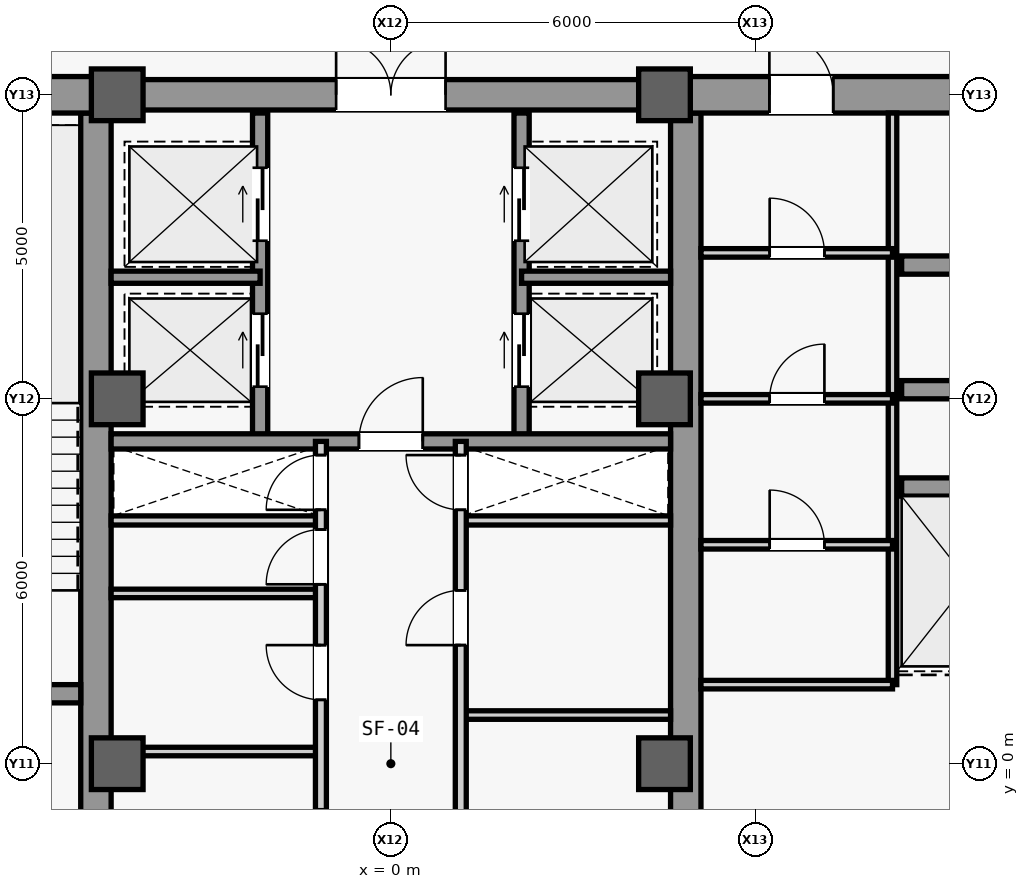
"""IFC4 building model, lengths in metres.
Left out: names, types, materials, properties, quantities, classifications, styles, units other than length and angle.
Written with IfcOpenShell. Run it as: python <this file> out.ifc"""

import sys

from ifc_helpers import new_model, si_unit, direction, frame, frame_2d, origin, origin_2d, place, context, subcontext, project, spatial, rectangle, extrude, source, transform, mapped, element, fill, save


model = new_model("IFC4")
c1 = context("Model", 3, precision=1e-05, world=origin(), true_north=direction((0.0, 1.0)))
c2 = subcontext(c1, "Body", "Model", "MODEL_VIEW")
j1 = project(units=[si_unit("LENGTHUNIT", "METRE"), si_unit("PLANEANGLEUNIT", "RADIAN")], contexts=[c1])
p1 = place(None, origin())
s1 = spatial("IfcSite", under=j1, at=p1, CompositionType="ELEMENT")
p2 = place(p1, origin())
s2 = spatial("IfcBuilding", under=s1, at=p2, CompositionType="ELEMENT")
p3 = place(p2, frame((0.0, 0.0, 235.1)))
s3 = spatial("IfcBuildingStorey", under=s2, at=p3, CompositionType="ELEMENT", Elevation=235.1)
m1 = source(origin(), c2, "Body", "SweptSolid", [
    extrude(rectangle(XDim=21.4, YDim=0.5, at=frame_2d((10.7, 0.0))), origin(), (0.0, 0.0, 1.0), 3.78),
])
for number, where, z_axis, x_axis in (
    (1, (-4.85, -10.7, 0.0), (0.0, 0.0, 1.0), (0.0, 1.0, 0.0)),
    (2, (4.85, -10.7, 0.0), (0.0, 0.0, 1.0), (0.0, 1.0, 0.0)),
):
    element("IfcWall", number, at=place(p3, frame(where, z_axis=z_axis, x_axis=x_axis)), inside=s3, PredefinedType="SHEAR", context=c2, shape_type="MappedRepresentation", body=[
        mapped(m1, transform((0.0, 0.0, 0.0), scale=1.0)),
    ])
m2 = source(origin(), c2, "Body", "SweptSolid", [
    extrude(rectangle(XDim=5.9, YDim=0.6, at=frame_2d((2.95, 0.0))), origin(), (0.0, 0.0, 1.0), 3.78),
])
p4 = place(p3, frame((-10.75, 11.0, 0.0), z_axis=(0.0, 0.0, 1.0), x_axis=(1.0, 0.0, 0.0)))
e3 = element("IfcWall", 3, at=p4, inside=s3, PredefinedType="SHEAR", context=c2, shape_type="MappedRepresentation", body=[
    mapped(m2, transform((0.0, 0.0, 0.0), scale=1.0)),
])
p5 = place(p3, frame((4.85, 11.0, 0.0), z_axis=(0.0, 0.0, 1.0), x_axis=(1.0, 0.0, 0.0)))
e4 = element("IfcWall", 4, at=p5, inside=s3, PredefinedType="SHEAR", context=c2, shape_type="MappedRepresentation", body=[
    mapped(m2, transform((0.0, 0.0, 0.0), scale=1.0)),
])
m3 = source(origin(), c2, "Body", "SweptSolid", [
    extrude(rectangle(XDim=1.05, YDim=2.2, at=frame_2d((0.525, 1.1))), frame((0.0, 0.31, 0.0), z_axis=(0.0, -1.0, 0.0), x_axis=(1.0, 0.0, 0.0)), (0.0, 0.0, 1.0), 0.62),
])
p6 = place(p5, frame((1.375, 0.0, 0.0)))
e5 = element("IfcOpeningElement", 5, at=p6, cuts=e4, PredefinedType="OPENING", context=c2, shape_type="MappedRepresentation", body=[
    mapped(m3, transform((0.0, 0.0, 0.0), scale=1.0)),
])
m4 = source(origin(), c2, "Body", "SweptSolid", [
    extrude(rectangle(XDim=5.65, YDim=0.3, at=frame_2d((2.825, 0.0))), origin(), (0.0, 0.0, 1.0), 3.78),
])
p7 = place(p3, frame((-10.75, 1.15, 0.0), z_axis=(0.0, 0.0, 1.0), x_axis=(1.0, 0.0, 0.0)))
e6 = element("IfcWall", 6, at=p7, inside=s3, PredefinedType="SHEAR", context=c2, shape_type="MappedRepresentation", body=[
    mapped(m4, transform((0.0, 0.0, 0.0), scale=1.0)),
])
m5 = source(origin(), c2, "Body", "SweptSolid", [
    extrude(rectangle(XDim=9.2, YDim=0.5, at=frame_2d((4.6, 0.0))), origin(), (0.0, 0.0, 1.0), 3.78),
])
p8 = place(p3, frame((-4.6, 11.0, 0.0), z_axis=(0.0, 0.0, 1.0), x_axis=(1.0, 0.0, 0.0)))
e7 = element("IfcWall", 7, at=p8, inside=s3, PredefinedType="SHEAR", context=c2, shape_type="MappedRepresentation", body=[
    mapped(m5, transform((0.0, 0.0, 0.0), scale=1.0)),
])
m6 = source(origin(), c2, "Body", "SweptSolid", [
    extrude(rectangle(XDim=1.8, YDim=2.25, at=frame_2d((0.9, 1.125))), frame((0.0, 0.26, 0.0), z_axis=(0.0, -1.0, 0.0), x_axis=(1.0, 0.0, 0.0)), (0.0, 0.0, 1.0), 0.52),
])
p9 = place(p8, frame((3.7, 0.0, 0.0)))
e8 = element("IfcOpeningElement", 8, at=p9, cuts=e7, PredefinedType="OPENING", context=c2, shape_type="MappedRepresentation", body=[
    mapped(m6, transform((0.0, 0.0, 0.0), scale=1.0)),
])
m7 = source(origin(), c2, "Body", "SweptSolid", [
    extrude(rectangle(XDim=0.85, YDim=0.85, at=origin_2d()), origin(), (0.0, 0.0, 1.0), 4.0),
])
for number, where, z_axis, x_axis in (
    (9, (-4.5, 0.0, 0.0), (0.0, 0.0, 1.0), (1.0, 0.0, 0.0)),
    (10, (-4.5, 6.0, 0.0), (0.0, 0.0, 1.0), (1.0, 0.0, 0.0)),
    (11, (-4.5, 11.0, 0.0), (0.0, 0.0, 1.0), (1.0, 0.0, 0.0)),
    (12, (4.5, 0.0, 0.0), (0.0, 0.0, 1.0), (1.0, 0.0, 0.0)),
    (13, (4.5, 6.0, 0.0), (0.0, 0.0, 1.0), (1.0, 0.0, 0.0)),
    (14, (4.5, 11.0, 0.0), (0.0, 0.0, 1.0), (1.0, 0.0, 0.0)),
):
    element("IfcColumn", number, at=place(p3, frame(where, z_axis=z_axis, x_axis=x_axis)), inside=s3, PredefinedType="COLUMN", context=c2, shape_type="MappedRepresentation", body=[
        mapped(m7, transform((0.0, 0.0, 0.0), scale=1.0)),
    ])
m8 = source(origin(), c2, "Body", "SweptSolid", [
    extrude(rectangle(XDim=2.3, YDim=0.3, at=frame_2d((1.15, 0.0))), origin(), (0.0, 0.0, 1.0), 3.78),
])
for number, where, z_axis, x_axis in (
    (15, (8.4, 4.55, 0.0), (0.0, 0.0, 1.0), (1.0, 0.0, 0.0)),
    (16, (8.4, 6.15, 0.0), (0.0, 0.0, 1.0), (1.0, 0.0, 0.0)),
    (17, (8.4, 8.2, 0.0), (0.0, 0.0, 1.0), (1.0, 0.0, 0.0)),
):
    element("IfcWall", number, at=place(p3, frame(where, z_axis=z_axis, x_axis=x_axis)), inside=s3, PredefinedType="SHEAR", context=c2, shape_type="MappedRepresentation", body=[
        mapped(m8, transform((0.0, 0.0, 0.0), scale=1.0)),
    ])
m9 = source(origin(), c2, "Body", "SweptSolid", [
    extrude(rectangle(XDim=9.4, YDim=0.14, at=frame_2d((4.7, 0.0))), origin(), (0.0, 0.0, 1.0), 3.78),
])
p10 = place(p3, frame((8.25, 1.3, 0.0), z_axis=(0.0, 0.0, 1.0), x_axis=(0.0, 1.0, 0.0)))
e18 = element("IfcWall", 18, at=p10, inside=s3, PredefinedType="PARTITIONING", context=c2, shape_type="MappedRepresentation", body=[
    mapped(m9, transform((0.0, 0.0, 0.0), scale=1.0)),
])
m10 = source(origin(), c2, "Body", "SweptSolid", [
    extrude(rectangle(XDim=3.15, YDim=0.14, at=frame_2d((1.575, 0.0))), origin(), (0.0, 0.0, 1.0), 3.78),
])
p11 = place(p3, frame((5.1, 1.3, 0.0), z_axis=(0.0, 0.0, 1.0), x_axis=(1.0, 0.0, 0.0)))
e19 = element("IfcWall", 19, at=p11, inside=s3, PredefinedType="PARTITIONING", context=c2, shape_type="MappedRepresentation", body=[
    mapped(m10, transform((0.0, 0.0, 0.0), scale=1.0)),
])
p12 = place(p3, frame((5.1, 8.4, 0.0), z_axis=(0.0, 0.0, 1.0), x_axis=(1.0, 0.0, 0.0)))
e20 = element("IfcWall", 20, at=p12, inside=s3, PredefinedType="PARTITIONING", context=c2, shape_type="MappedRepresentation", body=[
    mapped(m10, transform((0.0, 0.0, 0.0), scale=1.0)),
])
m11 = source(origin(), c2, "Body", "SweptSolid", [
    extrude(rectangle(XDim=0.9, YDim=2.15, at=frame_2d((0.45, 1.075))), frame((0.0, 0.08, 0.0), z_axis=(0.0, -1.0, 0.0), x_axis=(1.0, 0.0, 0.0)), (0.0, 0.0, 1.0), 0.16),
])
p13 = place(p12, frame((1.13, 0.0, 0.0)))
e21 = element("IfcOpeningElement", 21, at=p13, cuts=e20, PredefinedType="OPENING", context=c2, shape_type="MappedRepresentation", body=[
    mapped(m11, transform((0.0, 0.0, 0.0), scale=1.0)),
])
p14 = place(p3, frame((5.1, 6.0, 0.0), z_axis=(0.0, 0.0, 1.0), x_axis=(1.0, 0.0, 0.0)))
e22 = element("IfcWall", 22, at=p14, inside=s3, PredefinedType="PARTITIONING", context=c2, shape_type="MappedRepresentation", body=[
    mapped(m10, transform((0.0, 0.0, 0.0), scale=1.0)),
])
p15 = place(p14, frame((1.13, 0.0, 0.0)))
e23 = element("IfcOpeningElement", 23, at=p15, cuts=e22, PredefinedType="OPENING", context=c2, shape_type="MappedRepresentation", body=[
    mapped(m11, transform((0.0, 0.0, 0.0), scale=1.0)),
])
p16 = place(p3, frame((5.1, 3.6, 0.0), z_axis=(0.0, 0.0, 1.0), x_axis=(1.0, 0.0, 0.0)))
e24 = element("IfcWall", 24, at=p16, inside=s3, PredefinedType="PARTITIONING", context=c2, shape_type="MappedRepresentation", body=[
    mapped(m10, transform((0.0, 0.0, 0.0), scale=1.0)),
])
p17 = place(p16, frame((1.13, 0.0, 0.0)))
e25 = element("IfcOpeningElement", 25, at=p17, cuts=e24, PredefinedType="OPENING", context=c2, shape_type="MappedRepresentation", body=[
    mapped(m11, transform((0.0, 0.0, 0.0), scale=1.0)),
])
m12 = source(origin(), c2, "Body", "SweptSolid", [
    extrude(rectangle(XDim=3.45, YDim=0.15, at=frame_2d((1.725, 0.0))), origin(), (0.0, 0.0, 1.0), 3.78),
])
for number, where, z_axis, x_axis in (
    (26, (-4.6, 4.0, 0.0), (0.0, 0.0, 1.0), (1.0, 0.0, 0.0)),
    (27, (1.15, 4.0, 0.0), (0.0, 0.0, 1.0), (1.0, 0.0, 0.0)),
):
    element("IfcWall", number, at=place(p3, frame(where, z_axis=z_axis, x_axis=x_axis)), inside=s3, PredefinedType="PARTITIONING", context=c2, shape_type="MappedRepresentation", body=[
        mapped(m12, transform((0.0, 0.0, 0.0), scale=1.0)),
    ])
m13 = source(origin(), c2, "Body", "SweptSolid", [
    extrude(rectangle(XDim=5.4, YDim=0.25, at=frame_2d((2.7, 0.0))), origin(), (0.0, 0.0, 1.0), 3.78),
])
p18 = place(p3, frame((-2.15, 5.3, 0.0), z_axis=(0.0, 0.0, 1.0), x_axis=(0.0, 1.0, 0.0)))
e28 = element("IfcWall", 28, at=p18, inside=s3, PredefinedType="SHEAR", context=c2, shape_type="MappedRepresentation", body=[
    mapped(m13, transform((0.0, 0.0, 0.0), scale=1.0)),
])
m14 = source(origin(), c2, "Body", "SweptSolid", [
    extrude(rectangle(XDim=1.2, YDim=2.3, at=frame_2d((0.6, 1.15))), frame((0.0, 0.135, 0.0), z_axis=(0.0, -1.0, 0.0), x_axis=(1.0, 0.0, 0.0)), (0.0, 0.0, 1.0), 0.27),
])
p19 = place(p18, frame((3.3, 0.0, 0.0)))
e29 = element("IfcOpeningElement", 29, at=p19, cuts=e28, PredefinedType="OPENING", context=c2, shape_type="MappedRepresentation", body=[
    mapped(m14, transform((0.0, 0.0, 0.0), scale=1.0)),
])
p20 = place(p18, frame((0.9, 0.0, 0.0)))
e30 = element("IfcOpeningElement", 30, at=p20, cuts=e28, PredefinedType="OPENING", context=c2, shape_type="MappedRepresentation", body=[
    mapped(m14, transform((0.0, 0.0, 0.0), scale=1.0)),
])
p21 = place(p3, frame((2.15, 5.3, 0.0), z_axis=(0.0, 0.0, 1.0), x_axis=(0.0, 1.0, 0.0)))
e31 = element("IfcWall", 31, at=p21, inside=s3, PredefinedType="SHEAR", context=c2, shape_type="MappedRepresentation", body=[
    mapped(m13, transform((0.0, 0.0, 0.0), scale=1.0)),
])
p22 = place(p21, frame((3.3, 0.0, 0.0)))
e32 = element("IfcOpeningElement", 32, at=p22, cuts=e31, PredefinedType="OPENING", context=c2, shape_type="MappedRepresentation", body=[
    mapped(m14, transform((0.0, 0.0, 0.0), scale=1.0)),
])
p23 = place(p21, frame((0.9, 0.0, 0.0)))
e33 = element("IfcOpeningElement", 33, at=p23, cuts=e31, PredefinedType="OPENING", context=c2, shape_type="MappedRepresentation", body=[
    mapped(m14, transform((0.0, 0.0, 0.0), scale=1.0)),
])
m15 = source(origin(), c2, "Body", "SweptSolid", [
    extrude(rectangle(XDim=2.45, YDim=0.2, at=frame_2d((1.225, 0.0))), origin(), (0.0, 0.0, 1.0), 3.78),
])
for number, where, z_axis, x_axis in (
    (34, (-4.6, 8.0, 0.0), (0.0, 0.0, 1.0), (1.0, 0.0, 0.0)),
    (35, (2.15, 8.0, 0.0), (0.0, 0.0, 1.0), (1.0, 0.0, 0.0)),
):
    element("IfcWall", number, at=place(p3, frame(where, z_axis=z_axis, x_axis=x_axis)), inside=s3, PredefinedType="SHEAR", context=c2, shape_type="MappedRepresentation", body=[
        mapped(m15, transform((0.0, 0.0, 0.0), scale=1.0)),
    ])
m16 = source(origin(), c2, "Body", "SweptSolid", [
    extrude(rectangle(XDim=9.2, YDim=0.25, at=frame_2d((4.6, 0.0))), origin(), (0.0, 0.0, 1.0), 3.78),
])
p24 = place(p3, frame((-4.6, 5.3, 0.0), z_axis=(0.0, 0.0, 1.0), x_axis=(1.0, 0.0, 0.0)))
e36 = element("IfcWall", 36, at=p24, inside=s3, PredefinedType="SHEAR", context=c2, shape_type="MappedRepresentation", body=[
    mapped(m16, transform((0.0, 0.0, 0.0), scale=1.0)),
])
m17 = source(origin(), c2, "Body", "SweptSolid", [
    extrude(rectangle(XDim=1.05, YDim=2.2, at=frame_2d((0.525, 1.1))), frame((0.0, 0.135, 0.0), z_axis=(0.0, -1.0, 0.0), x_axis=(1.0, 0.0, 0.0)), (0.0, 0.0, 1.0), 0.27),
])
p25 = place(p24, frame((4.075, 0.0, 0.0)))
e37 = element("IfcOpeningElement", 37, at=p25, cuts=e36, PredefinedType="OPENING", context=c2, shape_type="MappedRepresentation", body=[
    mapped(m17, transform((0.0, 0.0, 0.0), scale=1.0)),
])
m18 = source(origin(), c2, "Body", "SweptSolid", [
    extrude(rectangle(XDim=3.45, YDim=0.14, at=frame_2d((1.725, 0.0))), origin(), (0.0, 0.0, 1.0), 3.085),
])
p26 = place(p3, frame((-4.6, 0.2, 0.0), z_axis=(0.0, 0.0, 1.0), x_axis=(1.0, 0.0, 0.0)))
e38 = element("IfcWall", 38, at=p26, inside=s3, PredefinedType="PARTITIONING", context=c2, shape_type="MappedRepresentation", body=[
    mapped(m18, transform((0.0, 0.0, 0.0), scale=1.0)),
])
m19 = source(origin(), c2, "Body", "SweptSolid", [
    extrude(rectangle(XDim=3.45, YDim=0.14, at=frame_2d((1.725, 0.0))), origin(), (0.0, 0.0, 1.0), 3.78),
])
p27 = place(p3, frame((-4.6, 2.8, 0.0), z_axis=(0.0, 0.0, 1.0), x_axis=(1.0, 0.0, 0.0)))
e39 = element("IfcWall", 39, at=p27, inside=s3, PredefinedType="PARTITIONING", context=c2, shape_type="MappedRepresentation", body=[
    mapped(m19, transform((0.0, 0.0, 0.0), scale=1.0)),
])
m20 = source(origin(), c2, "Body", "SweptSolid", [
    extrude(rectangle(XDim=10.6, YDim=0.18, at=frame_2d((5.3, 0.0))), origin(), (0.0, 0.0, 1.0), 3.78),
])
p28 = place(p3, frame((-1.15, -5.3, 0.0), z_axis=(0.0, 0.0, 1.0), x_axis=(0.0, 1.0, 0.0)))
e40 = element("IfcWall", 40, at=p28, inside=s3, PredefinedType="PARTITIONING", context=c2, shape_type="MappedRepresentation", body=[
    mapped(m20, transform((0.0, 0.0, 0.0), scale=1.0)),
])
m21 = source(origin(), c2, "Body", "SweptSolid", [
    extrude(rectangle(XDim=0.9, YDim=2.15, at=frame_2d((0.45, 1.075))), frame((0.0, 0.1, 0.0), z_axis=(0.0, -1.0, 0.0), x_axis=(1.0, 0.0, 0.0)), (0.0, 0.0, 1.0), 0.2),
])
p29 = place(p28, frame((0.9, 0.0, 0.0)))
e41 = element("IfcOpeningElement", 41, at=p29, cuts=e40, PredefinedType="OPENING", context=c2, shape_type="MappedRepresentation", body=[
    mapped(m21, transform((0.0, 0.0, 0.0), scale=1.0)),
])
p30 = place(p28, frame((3.65, 0.0, 0.0)))
e42 = element("IfcOpeningElement", 42, at=p30, cuts=e40, PredefinedType="OPENING", context=c2, shape_type="MappedRepresentation", body=[
    mapped(m21, transform((0.0, 0.0, 0.0), scale=1.0)),
])
p31 = place(p28, frame((6.35, 0.0, 0.0)))
e43 = element("IfcOpeningElement", 43, at=p31, cuts=e40, PredefinedType="OPENING", context=c2, shape_type="MappedRepresentation", body=[
    mapped(m21, transform((0.0, 0.0, 0.0), scale=1.0)),
])
p32 = place(p28, frame((8.25, 0.0, 0.0)))
e44 = element("IfcOpeningElement", 44, at=p32, cuts=e40, PredefinedType="OPENING", context=c2, shape_type="MappedRepresentation", body=[
    mapped(m21, transform((0.0, 0.0, 0.0), scale=1.0)),
])
p33 = place(p28, frame((9.475, 0.0, 0.0)))
e45 = element("IfcOpeningElement", 45, at=p33, cuts=e40, PredefinedType="OPENING", context=c2, shape_type="MappedRepresentation", body=[
    mapped(m21, transform((0.0, 0.0, 0.0), scale=1.0)),
])
p34 = place(p3, frame((1.15, 0.8, 0.0), z_axis=(0.0, 0.0, 1.0), x_axis=(1.0, 0.0, 0.0)))
e46 = element("IfcWall", 46, at=p34, inside=s3, PredefinedType="PARTITIONING", context=c2, shape_type="MappedRepresentation", body=[
    mapped(m19, transform((0.0, 0.0, 0.0), scale=1.0)),
])
p35 = place(p3, frame((1.15, -5.3, 0.0), z_axis=(0.0, 0.0, 1.0), x_axis=(0.0, 1.0, 0.0)))
e47 = element("IfcWall", 47, at=p35, inside=s3, PredefinedType="PARTITIONING", context=c2, shape_type="MappedRepresentation", body=[
    mapped(m20, transform((0.0, 0.0, 0.0), scale=1.0)),
])
p36 = place(p35, frame((2.6, 0.0, 0.0)))
e48 = element("IfcOpeningElement", 48, at=p36, cuts=e47, PredefinedType="OPENING", context=c2, shape_type="MappedRepresentation", body=[
    mapped(m21, transform((0.0, 0.0, 0.0), scale=1.0)),
])
p37 = place(p35, frame((7.25, 0.0, 0.0)))
e49 = element("IfcOpeningElement", 49, at=p37, cuts=e47, PredefinedType="OPENING", context=c2, shape_type="MappedRepresentation", body=[
    mapped(m21, transform((0.0, 0.0, 0.0), scale=1.0)),
])
p38 = place(p35, frame((9.475, 0.0, 0.0)))
e50 = element("IfcOpeningElement", 50, at=p38, cuts=e47, PredefinedType="OPENING", context=c2, shape_type="MappedRepresentation", body=[
    mapped(m21, transform((0.0, 0.0, 0.0), scale=1.0)),
])
m22 = source(origin(), c2, "Body", "SweptSolid", [
    extrude(rectangle(XDim=1.05, YDim=2.2, at=frame_2d((0.525, 1.1))), frame((0.0, 0.025, 0.0), z_axis=(0.0, -1.0, 0.0), x_axis=(1.0, 0.0, 0.0)), (0.0, 0.0, 1.0), 0.05),
])
p39 = place(p6, origin())
e51 = element("IfcDoor", 51, at=p39, inside=s3, OperationType="SINGLE_SWING_LEFT", PredefinedType="DOOR", context=c2, shape_type="MappedRepresentation", body=[
    mapped(m22, transform((0.0, 0.0, 0.0), scale=1.0)),
])
fill(e5, e51)
m23 = source(origin(), c2, "Body", "SweptSolid", [
    extrude(rectangle(XDim=0.9, YDim=2.15, at=frame_2d((0.45, 1.075))), frame((0.0, 0.025, 0.0), z_axis=(0.0, -1.0, 0.0), x_axis=(1.0, 0.0, 0.0)), (0.0, 0.0, 1.0), 0.05),
])
p40 = place(p13, origin())
e52 = element("IfcDoor", 52, at=p40, inside=s3, OperationType="SINGLE_SWING_LEFT", PredefinedType="DOOR", context=c2, shape_type="MappedRepresentation", body=[
    mapped(m23, transform((0.0, 0.0, 0.0), scale=1.0)),
])
fill(e21, e52)
p41 = place(p15, origin())
e53 = element("IfcDoor", 53, at=p41, inside=s3, OperationType="SINGLE_SWING_RIGHT", PredefinedType="DOOR", context=c2, shape_type="MappedRepresentation", body=[
    mapped(m23, transform((0.0, 0.0, 0.0), scale=1.0)),
])
fill(e23, e53)
p42 = place(p17, origin())
e54 = element("IfcDoor", 54, at=p42, inside=s3, OperationType="SINGLE_SWING_LEFT", PredefinedType="DOOR", context=c2, shape_type="MappedRepresentation", body=[
    mapped(m23, transform((0.0, 0.0, 0.0), scale=1.0)),
])
fill(e25, e54)
p43 = place(p25, origin())
e55 = element("IfcDoor", 55, at=p43, inside=s3, OperationType="SINGLE_SWING_RIGHT", PredefinedType="DOOR", context=c2, shape_type="MappedRepresentation", body=[
    mapped(m22, transform((0.0, 0.0, 0.0), scale=1.0)),
])
fill(e37, e55)
m24 = source(origin(), c2, "Body", "SweptSolid", [
    extrude(rectangle(XDim=1.8, YDim=2.25, at=frame_2d((0.9, 1.125))), frame((0.0, 0.025, 0.0), z_axis=(0.0, -1.0, 0.0), x_axis=(1.0, 0.0, 0.0)), (0.0, 0.0, 1.0), 0.05),
])
p44 = place(p9, origin())
e56 = element("IfcDoor", 56, at=p44, inside=s3, OperationType="SINGLE_SWING_RIGHT", PredefinedType="DOOR", context=c2, shape_type="MappedRepresentation", body=[
    mapped(m24, transform((0.0, 0.0, 0.0), scale=1.0)),
])
fill(e8, e56)
p45 = place(p31, origin())
e57 = element("IfcDoor", 57, at=p45, inside=s3, OperationType="SINGLE_SWING_RIGHT", PredefinedType="DOOR", context=c2, shape_type="MappedRepresentation", body=[
    mapped(m23, transform((0.0, 0.0, 0.0), scale=1.0)),
])
fill(e43, e57)
p46 = place(p32, origin())
e58 = element("IfcDoor", 58, at=p46, inside=s3, OperationType="SINGLE_SWING_LEFT", PredefinedType="DOOR", context=c2, shape_type="MappedRepresentation", body=[
    mapped(m23, transform((0.0, 0.0, 0.0), scale=1.0)),
])
fill(e44, e58)
p47 = place(p37, origin())
e59 = element("IfcDoor", 59, at=p47, inside=s3, OperationType="SINGLE_SWING_LEFT", PredefinedType="DOOR", context=c2, shape_type="MappedRepresentation", body=[
    mapped(m23, transform((0.0, 0.0, 0.0), scale=1.0)),
])
fill(e49, e59)
p48 = place(p33, origin())
e60 = element("IfcDoor", 60, at=p48, inside=s3, OperationType="SINGLE_SWING_LEFT", PredefinedType="DOOR", context=c2, shape_type="MappedRepresentation", body=[
    mapped(m23, transform((0.0, 0.0, 0.0), scale=1.0)),
])
fill(e45, e60)
p49 = place(p38, origin())
e61 = element("IfcDoor", 61, at=p49, inside=s3, OperationType="SINGLE_SWING_RIGHT", PredefinedType="DOOR", context=c2, shape_type="MappedRepresentation", body=[
    mapped(m23, transform((0.0, 0.0, 0.0), scale=1.0)),
])
fill(e50, e61)
m25 = source(origin(), c2, "Body", "SweptSolid", [
    extrude(rectangle(XDim=1.2, YDim=2.3, at=frame_2d((0.6, 1.15))), frame((0.0, 0.025, 0.0), z_axis=(0.0, -1.0, 0.0), x_axis=(1.0, 0.0, 0.0)), (0.0, 0.0, 1.0), 0.05),
])
p50 = place(p19, origin())
e62 = element("IfcDoor", 62, at=p50, inside=s3, OperationType="SLIDING_TO_LEFT", PredefinedType="DOOR", context=c2, shape_type="MappedRepresentation", body=[
    mapped(m25, transform((0.0, 0.0, 0.0), scale=1.0)),
])
fill(e29, e62)
p51 = place(p22, origin())
e63 = element("IfcDoor", 63, at=p51, inside=s3, OperationType="SLIDING_TO_LEFT", PredefinedType="DOOR", context=c2, shape_type="MappedRepresentation", body=[
    mapped(m25, transform((0.0, 0.0, 0.0), scale=1.0)),
])
fill(e32, e63)
p52 = place(p20, origin())
e64 = element("IfcDoor", 64, at=p52, inside=s3, OperationType="SLIDING_TO_LEFT", PredefinedType="DOOR", context=c2, shape_type="MappedRepresentation", body=[
    mapped(m25, transform((0.0, 0.0, 0.0), scale=1.0)),
])
fill(e30, e64)
p53 = place(p23, origin())
e65 = element("IfcDoor", 65, at=p53, inside=s3, OperationType="SLIDING_TO_LEFT", PredefinedType="DOOR", context=c2, shape_type="MappedRepresentation", body=[
    mapped(m25, transform((0.0, 0.0, 0.0), scale=1.0)),
])
fill(e33, e65)
save(model, sys.argv[1])
